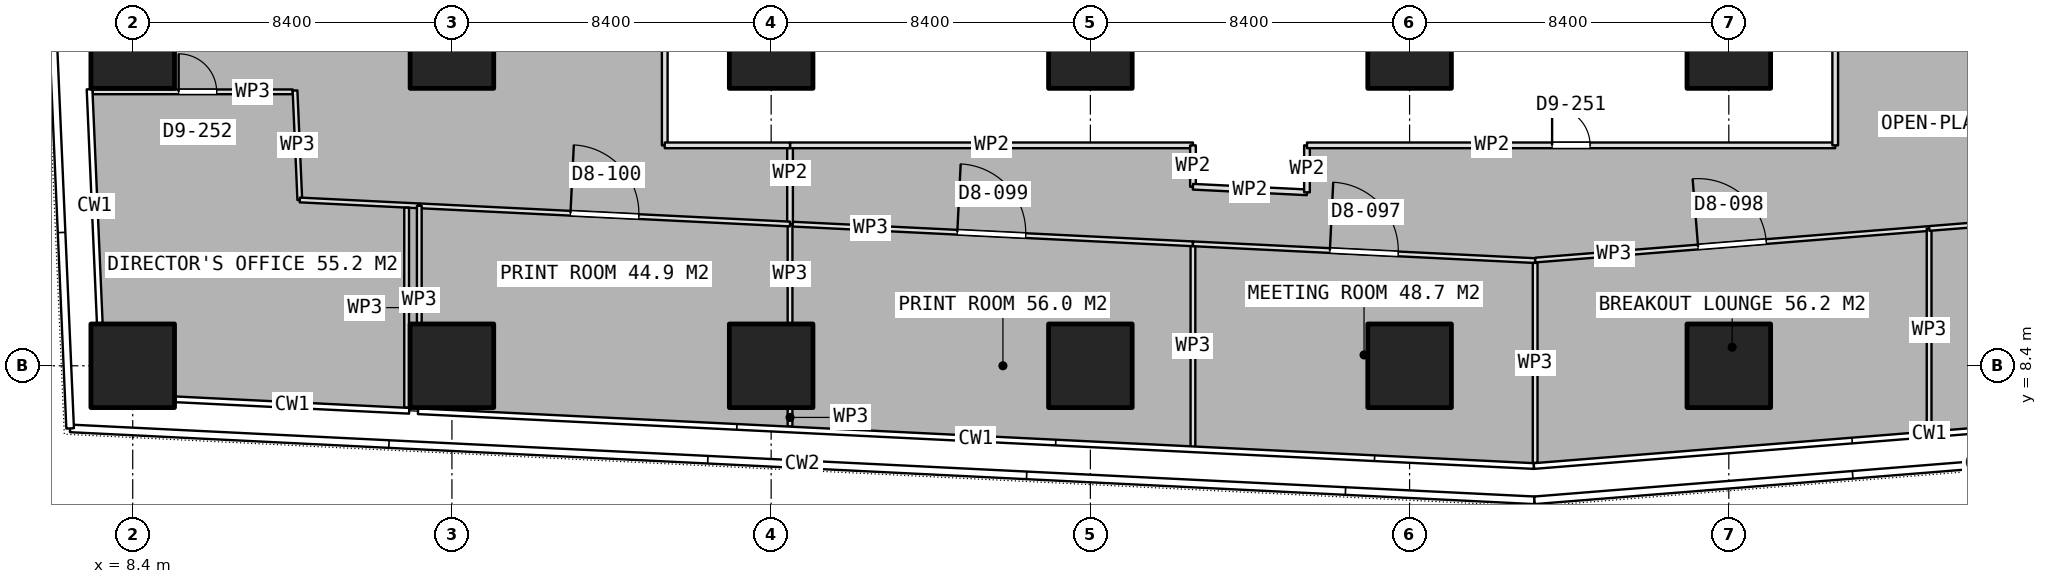
"""IFC4 building model, lengths in metres.
Left out: names, types, materials, properties, quantities, classifications, styles, units other than length and angle.
Written with IfcOpenShell. Run it as: python <this file> out.ifc"""

import sys

from ifc_helpers import new_model, si_unit, direction, frame, frame_2d, origin, origin_2d, place, context, subcontext, project, spatial, rectangle, extrude, element, fill, save


model = new_model("IFC4")
c1 = context("Model", 3, precision=1e-05, world=origin(), true_north=direction((0.0, 1.0)))
c2 = subcontext(c1, "Body", "Model", "MODEL_VIEW")
j1 = project(units=[si_unit("LENGTHUNIT", "METRE"), si_unit("PLANEANGLEUNIT", "RADIAN")], contexts=[c1])
p1 = place(None, origin())
s1 = spatial("IfcSite", under=j1, at=p1, CompositionType="ELEMENT")
p2 = place(p1, origin())
s2 = spatial("IfcBuilding", under=s1, at=p2, CompositionType="ELEMENT")
p3 = place(p2, frame((0.0, 0.0, 74.15)))
s3 = spatial("IfcBuildingStorey", under=s2, at=p3, CompositionType="ELEMENT", Elevation=74.15)
for number, where, z_axis, x_axis in (
    (1, (8.4, 8.4, 0.0), (0.0, 0.0, 1.0), (1.0, 0.0, 0.0)),
    (2, (8.4, 16.8, 0.0), (0.0, 0.0, 1.0), (1.0, 0.0, 0.0)),
    (3, (16.8, 8.4, 0.0), (0.0, 0.0, 1.0), (1.0, 0.0, 0.0)),
    (4, (16.8, 16.8, 0.0), (0.0, 0.0, 1.0), (1.0, 0.0, 0.0)),
    (5, (25.2, 8.4, 0.0), (0.0, 0.0, 1.0), (1.0, 0.0, 0.0)),
    (6, (25.2, 16.8, 0.0), (0.0, 0.0, 1.0), (1.0, 0.0, 0.0)),
    (7, (33.6, 8.4, 0.0), (0.0, 0.0, 1.0), (1.0, 0.0, 0.0)),
    (8, (33.6, 16.8, 0.0), (0.0, 0.0, 1.0), (1.0, 0.0, 0.0)),
    (9, (42.0, 8.4, 0.0), (0.0, 0.0, 1.0), (1.0, 0.0, 0.0)),
    (10, (42.0, 16.8, 0.0), (0.0, 0.0, 1.0), (1.0, 0.0, 0.0)),
    (11, (50.4, 8.4, 0.0), (0.0, 0.0, 1.0), (1.0, 0.0, 0.0)),
    (12, (50.4, 16.8, 0.0), (0.0, 0.0, 1.0), (1.0, 0.0, 0.0)),
):
    element("IfcColumn", number, at=place(p3, frame(where, z_axis=z_axis, x_axis=x_axis)), inside=s3, PredefinedType="COLUMN", context=c2, shape_type="SweptSolid", body=[
        extrude(rectangle(XDim=2.2, YDim=2.2, at=origin_2d()), origin(), (0.0, 0.0, 1.0), 3.75),
    ])
p4 = place(p3, frame((36.299, 6.253, 0.0), z_axis=(0.0, 0.0, 1.0), x_axis=(0.0, 1.0, 0.0)))
e13 = element("IfcWall", 13, at=p4, inside=s3, PredefinedType="PARTITIONING", context=c2, shape_type="SweptSolid", body=[
    extrude(rectangle(XDim=5.356, YDim=0.125, at=frame_2d((2.678, 0.0))), origin(), (0.0, 0.0, 1.0), 3.5),
])
p5 = place(p3, frame((36.299, 11.609, 0.0), z_axis=(0.0, 0.0, 1.0), x_axis=(0.998798622269, -0.049003185143, 0.0)))
e14 = element("IfcWall", 14, at=p5, inside=s3, PredefinedType="PARTITIONING", context=c2, shape_type="SweptSolid", body=[
    extrude(rectangle(XDim=9.018, YDim=0.125, at=frame_2d((4.509, 0.0))), origin(), (0.0, 0.0, 1.0), 3.5),
])
p6 = place(p5, frame((3.608, 0.0, 0.0)))
e15 = element("IfcOpeningElement", 15, at=p6, cuts=e14, PredefinedType="OPENING", context=c2, shape_type="SweptSolid", body=[
    extrude(rectangle(XDim=1.8, YDim=2.1, at=frame_2d((0.9, 1.05))), frame((0.0, 0.073, 0.0), z_axis=(0.0, -1.0, 0.0), x_axis=(1.0, 0.0, 0.0)), (0.0, 0.0, 1.0), 0.145),
])
p7 = place(p3, frame((45.304, 11.107, 0.0), z_axis=(0.0, 0.0, 1.0), x_axis=(0.0, -1.0, 0.0)))
e16 = element("IfcWall", 16, at=p7, inside=s3, PredefinedType="PARTITIONING", context=c2, shape_type="SweptSolid", body=[
    extrude(rectangle(XDim=5.262, YDim=0.125, at=frame_2d((2.631, 0.0))), origin(), (0.0, 0.0, 1.0), 3.5),
])
p8 = place(p3, frame((45.307, 11.182, 0.0), z_axis=(0.0, 0.0, 1.0), x_axis=(0.996807957409, 0.079836683593, 0.0)))
e17 = element("IfcWall", 17, at=p8, inside=s3, PredefinedType="PARTITIONING", context=c2, shape_type="SweptSolid", body=[
    extrude(rectangle(XDim=10.397, YDim=0.125, at=frame_2d((5.199, 0.0))), origin(), (0.0, 0.0, 1.0), 3.5),
])
p9 = place(p8, frame((4.298, 0.0, 0.0)))
e18 = element("IfcOpeningElement", 18, at=p9, cuts=e17, PredefinedType="OPENING", context=c2, shape_type="SweptSolid", body=[
    extrude(rectangle(XDim=1.8, YDim=2.1, at=frame_2d((0.9, 1.05))), frame((0.0, 0.073, 0.0), z_axis=(0.0, -1.0, 0.0), x_axis=(1.0, 0.0, 0.0)), (0.0, 0.0, 1.0), 0.145),
])
p10 = place(p3, frame((55.671, 12.012, 0.0), z_axis=(0.0, 0.0, 1.0), x_axis=(0.0, -1.0, 0.0)))
e19 = element("IfcWall", 19, at=p10, inside=s3, PredefinedType="PARTITIONING", context=c2, shape_type="SweptSolid", body=[
    extrude(rectangle(XDim=5.337, YDim=0.125, at=frame_2d((2.668, 0.0))), origin(), (0.0, 0.0, 1.0), 3.5),
])
p11 = place(p3, frame((55.673, 12.013, 0.0), z_axis=(0.0, 0.0, 1.0), x_axis=(0.996811579084, 0.079791451955, 0.0)))
e20 = element("IfcWall", 20, at=p11, inside=s3, PredefinedType="PARTITIONING", context=c2, shape_type="SweptSolid", body=[
    extrude(rectangle(XDim=7.346, YDim=0.125, at=frame_2d((3.673, 0.0))), origin(), (0.0, 0.0, 1.0), 3.5),
])
p12 = place(p11, frame((3.173, 0.0, 0.0)))
e21 = element("IfcOpeningElement", 21, at=p12, cuts=e20, PredefinedType="OPENING", context=c2, shape_type="SweptSolid", body=[
    extrude(rectangle(XDim=1.0, YDim=2.1, at=frame_2d((0.5, 1.05))), frame((0.0, 0.073, 0.0), z_axis=(0.0, -1.0, 0.0), x_axis=(1.0, 0.0, 0.0)), (0.0, 0.0, 1.0), 0.145),
])
p13 = place(p3, frame((25.697, 12.13, 0.0), z_axis=(0.0, 0.0, 1.0), x_axis=(0.99879453849, -0.049086351277, 0.0)))
e22 = element("IfcWall", 22, at=p13, inside=s3, PredefinedType="PARTITIONING", context=c2, shape_type="SweptSolid", body=[
    extrude(rectangle(XDim=10.614, YDim=0.125, at=frame_2d((5.307, 0.0))), origin(), (0.0, 0.0, 1.0), 3.5),
])
p14 = place(p13, frame((4.407, 0.0, 0.0)))
e23 = element("IfcOpeningElement", 23, at=p14, cuts=e22, PredefinedType="OPENING", context=c2, shape_type="SweptSolid", body=[
    extrude(rectangle(XDim=1.8, YDim=2.1, at=frame_2d((0.9, 1.05))), frame((0.0, 0.073, 0.0), z_axis=(0.0, -1.0, 0.0), x_axis=(1.0, 0.0, 0.0)), (0.0, 0.0, 1.0), 0.145),
])
p15 = place(p3, frame((25.697, 6.803, 0.0), z_axis=(0.0, 0.0, 1.0), x_axis=(0.0, 1.0, 0.0)))
e24 = element("IfcWall", 24, at=p15, inside=s3, PredefinedType="PARTITIONING", context=c2, shape_type="SweptSolid", body=[
    extrude(rectangle(XDim=0.477, YDim=0.125, at=frame_2d((0.239, 0.0))), origin(), (0.0, 0.0, 1.0), 3.5),
])
p16 = place(p3, frame((25.697, 9.52, 0.0), z_axis=(0.0, 0.0, 1.0), x_axis=(0.0, 1.0, 0.0)))
e25 = element("IfcWall", 25, at=p16, inside=s3, PredefinedType="PARTITIONING", context=c2, shape_type="SweptSolid", body=[
    extrude(rectangle(XDim=2.61, YDim=0.125, at=frame_2d((1.305, 0.0))), origin(), (0.0, 0.0, 1.0), 3.5),
])
p17 = place(p3, frame((25.697, 12.13, 0.0), z_axis=(0.0, 0.0, 1.0), x_axis=(0.0, 1.0, 0.0)))
e26 = element("IfcWall", 26, at=p17, inside=s3, PredefinedType="PARTITIONING", context=c2, shape_type="SweptSolid", body=[
    extrude(rectangle(XDim=2.07, YDim=0.15, at=frame_2d((1.035, 0.0))), origin(), (0.0, 0.0, 1.0), 3.5),
])
p18 = place(p3, frame((25.697, 14.2, 0.0), z_axis=(0.0, 0.0, 1.0), x_axis=(1.0, 0.0, 0.0)))
e27 = element("IfcWall", 27, at=p18, inside=s3, PredefinedType="PARTITIONING", context=c2, shape_type="SweptSolid", body=[
    extrude(rectangle(XDim=10.603, YDim=0.15, at=frame_2d((5.302, 0.0))), origin(), (0.0, 0.0, 1.0), 3.5),
])
p19 = place(p3, frame((36.3, 14.2, 0.0), z_axis=(0.0, 0.0, 1.0), x_axis=(0.0, -1.0, 0.0)))
e28 = element("IfcWall", 28, at=p19, inside=s3, PredefinedType="PARTITIONING", context=c2, shape_type="SweptSolid", body=[
    extrude(rectangle(XDim=1.089, YDim=0.15, at=frame_2d((0.544, 0.0))), origin(), (0.0, 0.0, 1.0), 3.5),
])
p20 = place(p3, frame((36.3, 13.111, 0.0), z_axis=(0.0, 0.0, 1.0), x_axis=(0.998802102454, -0.048932199355, 0.0)))
e29 = element("IfcWall", 29, at=p20, inside=s3, PredefinedType="PARTITIONING", context=c2, shape_type="SweptSolid", body=[
    extrude(rectangle(XDim=3.004, YDim=0.15, at=frame_2d((1.502, 0.0))), origin(), (0.0, 0.0, 1.0), 3.5),
])
p21 = place(p3, frame((39.3, 12.964, 0.0), z_axis=(0.0, 0.0, 1.0), x_axis=(0.0, 1.0, 0.0)))
e30 = element("IfcWall", 30, at=p21, inside=s3, PredefinedType="PARTITIONING", context=c2, shape_type="SweptSolid", body=[
    extrude(rectangle(XDim=1.236, YDim=0.15, at=frame_2d((0.618, 0.0))), origin(), (0.0, 0.0, 1.0), 3.5),
])
p22 = place(p3, frame((39.3, 14.2, 0.0), z_axis=(0.0, 0.0, 1.0), x_axis=(1.0, 0.0, 0.0)))
e31 = element("IfcWall", 31, at=p22, inside=s3, PredefinedType="PARTITIONING", context=c2, shape_type="SweptSolid", body=[
    extrude(rectangle(XDim=13.9, YDim=0.15, at=frame_2d((6.95, 0.0))), origin(), (0.0, 0.0, 1.0), 3.5),
])
p23 = place(p22, frame((6.45, 0.0, 0.0)))
e32 = element("IfcOpeningElement", 32, at=p23, cuts=e31, PredefinedType="OPENING", context=c2, shape_type="SweptSolid", body=[
    extrude(rectangle(XDim=1.0, YDim=2.1, at=frame_2d((0.5, 1.05))), frame((0.0, 0.085, 0.0), z_axis=(0.0, -1.0, 0.0), x_axis=(1.0, 0.0, 0.0)), (0.0, 0.0, 1.0), 0.17),
])
p24 = place(p3, frame((53.2, 14.2, 0.0), z_axis=(0.0, 0.0, 1.0), x_axis=(0.0, 1.0, 0.0)))
e33 = element("IfcWall", 33, at=p24, inside=s3, PredefinedType="PARTITIONING", context=c2, shape_type="SweptSolid", body=[
    extrude(rectangle(XDim=11.352, YDim=0.15, at=frame_2d((5.676, 0.0))), origin(), (0.0, 0.0, 1.0), 3.5),
])
p25 = place(p3, frame((7.347, 15.608, 0.0), z_axis=(0.0, 0.0, 1.0), x_axis=(1.0, 0.0, 0.0)))
e34 = element("IfcWall", 34, at=p25, inside=s3, PredefinedType="PARTITIONING", context=c2, shape_type="SweptSolid", body=[
    extrude(rectangle(XDim=5.263, YDim=0.125, at=frame_2d((2.632, 0.0))), origin(), (0.0, 0.0, 1.0), 3.5),
])
p26 = place(p25, frame((2.262, 0.0, 0.0)))
e35 = element("IfcOpeningElement", 35, at=p26, cuts=e34, PredefinedType="OPENING", context=c2, shape_type="SweptSolid", body=[
    extrude(rectangle(XDim=1.0, YDim=2.1, at=frame_2d((0.5, 1.05))), frame((0.0, 0.073, 0.0), z_axis=(0.0, -1.0, 0.0), x_axis=(1.0, 0.0, 0.0)), (0.0, 0.0, 1.0), 0.145),
])
p27 = place(p3, frame((12.671, 15.643, 0.0), z_axis=(0.0, 0.0, 1.0), x_axis=(0.043782676762, -0.999041078843, 0.0)))
e36 = element("IfcWall", 36, at=p27, inside=s3, PredefinedType="PARTITIONING", context=c2, shape_type="SweptSolid", body=[
    extrude(rectangle(XDim=2.883, YDim=0.125, at=frame_2d((1.441, 0.0))), origin(), (0.0, 0.0, 1.0), 3.5),
])
p28 = place(p3, frame((12.797, 12.763, 0.0), z_axis=(0.0, 0.0, 1.0), x_axis=(0.998790140287, -0.049175762993, 0.0)))
e37 = element("IfcWall", 37, at=p28, inside=s3, PredefinedType="PARTITIONING", context=c2, shape_type="SweptSolid", body=[
    extrude(rectangle(XDim=3.133, YDim=0.125, at=frame_2d((1.566, 0.0))), origin(), (0.0, 0.0, 1.0), 3.5),
])
p29 = place(p3, frame((15.608, 12.562, 0.0), z_axis=(0.0, 0.0, 1.0), x_axis=(0.0, -1.0, 0.0)))
e38 = element("IfcWall", 38, at=p29, inside=s3, PredefinedType="PARTITIONING", context=c2, shape_type="SweptSolid", body=[
    extrude(rectangle(XDim=5.263, YDim=0.125, at=frame_2d((2.631, 0.0))), origin(), (0.0, 0.0, 1.0), 3.5),
])
p30 = place(p3, frame((15.941, 12.609, 0.0), z_axis=(0.0, 0.0, 1.0), x_axis=(0.998796633854, -0.049043696865, 0.0)))
e39 = element("IfcWall", 39, at=p30, inside=s3, PredefinedType="PARTITIONING", context=c2, shape_type="SweptSolid", body=[
    extrude(rectangle(XDim=9.767, YDim=0.125, at=frame_2d((4.883, 0.0))), origin(), (0.0, 0.0, 1.0), 3.5),
])
p31 = place(p30, frame((3.983, 0.0, 0.0)))
e40 = element("IfcOpeningElement", 40, at=p31, cuts=e39, PredefinedType="OPENING", context=c2, shape_type="SweptSolid", body=[
    extrude(rectangle(XDim=1.8, YDim=2.1, at=frame_2d((0.9, 1.05))), frame((0.0, 0.073, 0.0), z_axis=(0.0, -1.0, 0.0), x_axis=(1.0, 0.0, 0.0)), (0.0, 0.0, 1.0), 0.145),
])
p32 = place(p3, frame((15.941, 9.52, 0.0), z_axis=(0.0, 0.0, 1.0), x_axis=(0.0, 1.0, 0.0)))
e41 = element("IfcWall", 41, at=p32, inside=s3, PredefinedType="PARTITIONING", context=c2, shape_type="SweptSolid", body=[
    extrude(rectangle(XDim=3.089, YDim=0.125, at=frame_2d((1.544, 0.0))), origin(), (0.0, 0.0, 1.0), 3.5),
])
p33 = place(p3, frame((22.4, 28.2, 0.0), z_axis=(0.0, 0.0, 1.0), x_axis=(0.0, -1.0, 0.0)))
e42 = element("IfcWall", 42, at=p33, inside=s3, PredefinedType="PARTITIONING", context=c2, shape_type="SweptSolid", body=[
    extrude(rectangle(XDim=14.0, YDim=0.15, at=frame_2d((7.0, 0.0))), origin(), (0.0, 0.0, 1.0), 3.5),
])
p34 = place(p3, frame((22.4, 14.2, 0.0), z_axis=(0.0, 0.0, 1.0), x_axis=(1.0, 0.0, 0.0)))
e43 = element("IfcWall", 43, at=p34, inside=s3, PredefinedType="PARTITIONING", context=c2, shape_type="SweptSolid", body=[
    extrude(rectangle(XDim=3.296, YDim=0.15, at=frame_2d((1.648, 0.0))), origin(), (0.0, 0.0, 1.0), 3.5),
])
p35 = place(p6, origin())
e44 = element("IfcDoor", 44, at=p35, inside=s3, OperationType="DOUBLE_DOOR_SINGLE_SWING", PredefinedType="DOOR", context=c2, shape_type="SweptSolid", body=[
    extrude(rectangle(XDim=1.8, YDim=2.1, at=frame_2d((0.9, 1.05))), frame((0.0, 0.025, 0.0), z_axis=(0.0, -1.0, 0.0), x_axis=(1.0, 0.0, 0.0)), (0.0, 0.0, 1.0), 0.05),
])
fill(e15, e44)
p36 = place(p9, origin())
e45 = element("IfcDoor", 45, at=p36, inside=s3, OperationType="DOUBLE_DOOR_SINGLE_SWING", PredefinedType="DOOR", context=c2, shape_type="SweptSolid", body=[
    extrude(rectangle(XDim=1.8, YDim=2.1, at=frame_2d((0.9, 1.05))), frame((0.0, 0.025, 0.0), z_axis=(0.0, -1.0, 0.0), x_axis=(1.0, 0.0, 0.0)), (0.0, 0.0, 1.0), 0.05),
])
fill(e18, e45)
p37 = place(p14, origin())
e46 = element("IfcDoor", 46, at=p37, inside=s3, OperationType="DOUBLE_DOOR_SINGLE_SWING", PredefinedType="DOOR", context=c2, shape_type="SweptSolid", body=[
    extrude(rectangle(XDim=1.8, YDim=2.1, at=frame_2d((0.9, 1.05))), frame((0.0, 0.025, 0.0), z_axis=(0.0, -1.0, 0.0), x_axis=(1.0, 0.0, 0.0)), (0.0, 0.0, 1.0), 0.05),
])
fill(e23, e46)
p38 = place(p23, origin())
e47 = element("IfcDoor", 47, at=p38, inside=s3, OperationType="SINGLE_SWING_LEFT", PredefinedType="DOOR", context=c2, shape_type="SweptSolid", body=[
    extrude(rectangle(XDim=1.0, YDim=2.1, at=frame_2d((0.5, 1.05))), frame((0.0, 0.025, 0.0), z_axis=(0.0, -1.0, 0.0), x_axis=(1.0, 0.0, 0.0)), (0.0, 0.0, 1.0), 0.05),
])
fill(e32, e47)
p39 = place(p26, origin())
e48 = element("IfcDoor", 48, at=p39, inside=s3, OperationType="SINGLE_SWING_LEFT", PredefinedType="DOOR", context=c2, shape_type="SweptSolid", body=[
    extrude(rectangle(XDim=1.0, YDim=2.1, at=frame_2d((0.5, 1.05))), frame((0.0, 0.025, 0.0), z_axis=(0.0, -1.0, 0.0), x_axis=(1.0, 0.0, 0.0)), (0.0, 0.0, 1.0), 0.05),
])
fill(e35, e48)
p40 = place(p31, origin())
e49 = element("IfcDoor", 49, at=p40, inside=s3, OperationType="DOUBLE_DOOR_SINGLE_SWING", PredefinedType="DOOR", context=c2, shape_type="SweptSolid", body=[
    extrude(rectangle(XDim=1.8, YDim=2.1, at=frame_2d((0.9, 1.05))), frame((0.0, 0.025, 0.0), z_axis=(0.0, -1.0, 0.0), x_axis=(1.0, 0.0, 0.0)), (0.0, 0.0, 1.0), 0.05),
])
fill(e40, e49)
save(model, sys.argv[1])
